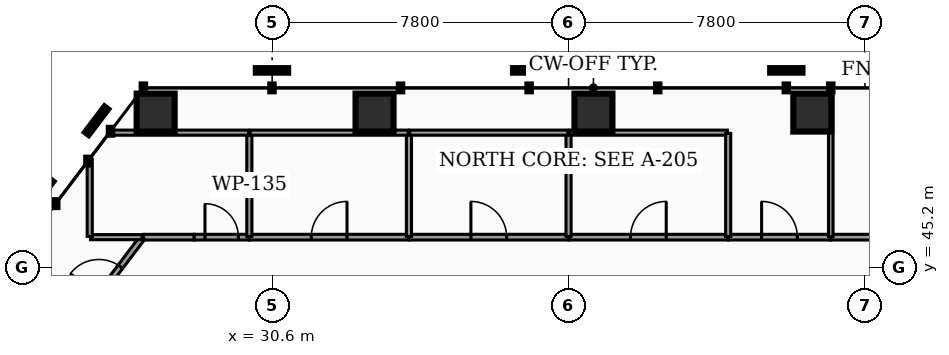
"""IFC4 building model, lengths in metres.
Left out: names, types, materials, properties, quantities, classifications, styles, units other than length and angle.
Written with IfcOpenShell. Run it as: python <this file> out.ifc"""

import sys

from ifc_helpers import new_model, si_unit, direction, frame, frame_2d, origin, origin_2d, place, context, subcontext, project, spatial, rectangle, hollow_rectangle, extrude, element, fill, save


model = new_model("IFC4")
c1 = context("Model", 3, precision=1e-05, world=origin(), true_north=direction((0.0, 1.0)))
c2 = subcontext(c1, "Body", "Model", "MODEL_VIEW")
j1 = project(units=[si_unit("LENGTHUNIT", "METRE"), si_unit("PLANEANGLEUNIT", "RADIAN")], contexts=[c1])
p1 = place(None, origin())
s1 = spatial("IfcSite", under=j1, at=p1, CompositionType="ELEMENT")
p2 = place(p1, origin())
s2 = spatial("IfcBuilding", under=s1, at=p2, CompositionType="ELEMENT")
p3 = place(p2, frame((0.0, 0.0, 56.1)))
s3 = spatial("IfcBuildingStorey", under=s2, at=p3, CompositionType="ELEMENT", Elevation=56.1)
for number, where, z_axis, x_axis in (
    (1, (44.814, 49.278, 0.0), (0.0, 0.0, 1.0), (1.0, 0.0, 0.0)),
    (2, (39.054, 49.278, 0.0), (0.0, 0.0, 1.0), (1.0, 0.0, 0.0)),
    (3, (33.294, 49.278, 0.0), (0.0, 0.0, 1.0), (1.0, 0.0, 0.0)),
    (4, (27.534, 49.278, 0.0), (0.0, 0.0, 1.0), (1.0, 0.0, 0.0)),
):
    element("IfcColumn", number, at=place(p3, frame(where, z_axis=z_axis, x_axis=x_axis)), inside=s3, PredefinedType="COLUMN", context=c2, shape_type="SweptSolid", body=[
        extrude(hollow_rectangle(XDim=1.0, YDim=1.0, WallThickness=0.05, at=origin_2d()), origin(), (0.0, 0.0, 1.0), 3.82),
    ])
p4 = place(p3, frame((27.217, 46.0, 0.0), z_axis=(0.0, 0.0, 1.0), x_axis=(1.0, 0.0, 0.0)))
e5 = element("IfcWall", 5, at=p4, inside=s3, PredefinedType="PARTITIONING", context=c2, shape_type="SweptSolid", body=[
    extrude(rectangle(XDim=1.333, YDim=0.15, at=frame_2d((0.667, 0.0))), origin(), (0.0, 0.0, 1.0), 2.777),
])
p5 = place(p3, frame((28.55, 46.0, 0.0), z_axis=(0.0, 0.0, 1.0), x_axis=(1.0, 0.0, 0.0)))
e6 = element("IfcWall", 6, at=p5, inside=s3, PredefinedType="PARTITIONING", context=c2, shape_type="SweptSolid", body=[
    extrude(rectangle(XDim=1.445, YDim=0.15, at=frame_2d((0.723, 0.0))), origin(), (0.0, 0.0, 1.0), 2.777),
])
p6 = place(p5, frame((0.282, 0.0, 0.0)))
e7 = element("IfcOpeningElement", 7, at=p6, cuts=e6, PredefinedType="OPENING", context=c2, shape_type="SweptSolid", body=[
    extrude(rectangle(XDim=0.88, YDim=2.05, at=frame_2d((0.44, 1.025))), frame((0.0, 0.085, 0.0), z_axis=(0.0, -1.0, 0.0), x_axis=(1.0, 0.0, 0.0)), (0.0, 0.0, 1.0), 0.17),
])
p7 = place(p3, frame((30.005, 46.0, 0.0), z_axis=(0.0, 0.0, 1.0), x_axis=(1.0, 0.0, 0.0)))
e8 = element("IfcWall", 8, at=p7, inside=s3, PredefinedType="PARTITIONING", context=c2, shape_type="SweptSolid", body=[
    extrude(rectangle(XDim=4.19, YDim=0.15, at=frame_2d((2.095, 0.0))), origin(), (0.0, 0.0, 1.0), 2.777),
])
p8 = place(p7, frame((1.625, 0.0, 0.0)))
e9 = element("IfcOpeningElement", 9, at=p8, cuts=e8, PredefinedType="OPENING", context=c2, shape_type="SweptSolid", body=[
    extrude(rectangle(XDim=0.94, YDim=2.05, at=frame_2d((0.47, 1.025))), frame((0.0, 0.085, 0.0), z_axis=(0.0, -1.0, 0.0), x_axis=(1.0, 0.0, 0.0)), (0.0, 0.0, 1.0), 0.17),
])
p9 = place(p3, frame((34.205, 46.0, 0.0), z_axis=(0.0, 0.0, 1.0), x_axis=(1.0, 0.0, 0.0)))
e10 = element("IfcWall", 10, at=p9, inside=s3, PredefinedType="PARTITIONING", context=c2, shape_type="SweptSolid", body=[
    extrude(rectangle(XDim=4.19, YDim=0.15, at=frame_2d((2.095, 0.0))), origin(), (0.0, 0.0, 1.0), 2.777),
])
p10 = place(p9, frame((1.625, 0.0, 0.0)))
e11 = element("IfcOpeningElement", 11, at=p10, cuts=e10, PredefinedType="OPENING", context=c2, shape_type="SweptSolid", body=[
    extrude(rectangle(XDim=0.94, YDim=2.05, at=frame_2d((0.47, 1.025))), frame((0.0, 0.085, 0.0), z_axis=(0.0, -1.0, 0.0), x_axis=(1.0, 0.0, 0.0)), (0.0, 0.0, 1.0), 0.17),
])
p11 = place(p3, frame((38.405, 46.0, 0.0), z_axis=(0.0, 0.0, 1.0), x_axis=(1.0, 0.0, 0.0)))
e12 = element("IfcWall", 12, at=p11, inside=s3, PredefinedType="PARTITIONING", context=c2, shape_type="SweptSolid", body=[
    extrude(rectangle(XDim=4.19, YDim=0.15, at=frame_2d((2.095, 0.0))), origin(), (0.0, 0.0, 1.0), 2.777),
])
p12 = place(p11, frame((1.625, 0.0, 0.0)))
e13 = element("IfcOpeningElement", 13, at=p12, cuts=e12, PredefinedType="OPENING", context=c2, shape_type="SweptSolid", body=[
    extrude(rectangle(XDim=0.94, YDim=2.05, at=frame_2d((0.47, 1.025))), frame((0.0, 0.085, 0.0), z_axis=(0.0, -1.0, 0.0), x_axis=(1.0, 0.0, 0.0)), (0.0, 0.0, 1.0), 0.17),
])
p13 = place(p3, frame((25.462, 43.71, 0.0), z_axis=(0.0, 0.0, 1.0), x_axis=(0.603800014115, 0.797135837204, 0.0)))
e14 = element("IfcWall", 14, at=p13, inside=s3, PredefinedType="PARTITIONING", context=c2, shape_type="SweptSolid", body=[
    extrude(rectangle(XDim=2.853, YDim=0.15, at=frame_2d((1.426, 0.0))), origin(), (0.0, 0.0, 1.0), 2.777),
])
p14 = place(p13, frame((0.956, 0.0, 0.0)))
e15 = element("IfcOpeningElement", 15, at=p14, cuts=e14, PredefinedType="OPENING", context=c2, shape_type="SweptSolid", body=[
    extrude(rectangle(XDim=0.94, YDim=2.05, at=frame_2d((0.47, 1.025))), frame((0.0, 0.085, 0.0), z_axis=(0.0, -1.0, 0.0), x_axis=(1.0, 0.0, 0.0)), (0.0, 0.0, 1.0), 0.17),
])
p15 = place(p3, frame((45.305, 46.0, 0.0), z_axis=(0.0, 0.0, 1.0), x_axis=(1.0, 0.0, 0.0)))
e16 = element("IfcWall", 16, at=p15, inside=s3, PredefinedType="PARTITIONING", context=c2, shape_type="SweptSolid", body=[
    extrude(rectangle(XDim=3.045, YDim=0.15, at=frame_2d((1.522, 0.0))), origin(), (0.0, 0.0, 1.0), 2.777),
])
p16 = place(p3, frame((42.605, 46.0, 0.0), z_axis=(0.0, 0.0, 1.0), x_axis=(1.0, 0.0, 0.0)))
e17 = element("IfcWall", 17, at=p16, inside=s3, PredefinedType="PARTITIONING", context=c2, shape_type="SweptSolid", body=[
    extrude(rectangle(XDim=2.69, YDim=0.15, at=frame_2d((1.345, 0.0))), origin(), (0.0, 0.0, 1.0), 2.777),
])
p17 = place(p16, frame((0.875, 0.0, 0.0)))
e18 = element("IfcOpeningElement", 18, at=p17, cuts=e17, PredefinedType="OPENING", context=c2, shape_type="SweptSolid", body=[
    extrude(rectangle(XDim=0.94, YDim=2.05, at=frame_2d((0.47, 1.025))), frame((0.0, 0.085, 0.0), z_axis=(0.0, -1.0, 0.0), x_axis=(1.0, 0.0, 0.0)), (0.0, 0.0, 1.0), 0.17),
])
p18 = place(p3, frame((30.0, 46.02, 0.0), z_axis=(0.0, 0.0, 1.0), x_axis=(0.0, 1.0, 0.0)))
e19 = element("IfcWall", 19, at=p18, inside=s3, PredefinedType="PARTITIONING", context=c2, shape_type="SweptSolid", body=[
    extrude(rectangle(XDim=2.71, YDim=0.135, at=frame_2d((1.355, 0.0))), origin(), (0.0, 0.0, 1.0), 2.777),
])
p19 = place(p3, frame((25.82, 46.0, 0.0), z_axis=(0.0, 0.0, 1.0), x_axis=(1.0, 0.0, 0.0)))
e20 = element("IfcWall", 20, at=p19, inside=s3, PredefinedType="PARTITIONING", context=c2, shape_type="SweptSolid", body=[
    extrude(rectangle(XDim=1.356, YDim=0.135, at=frame_2d((0.678, 0.0))), origin(), (0.0, 0.0, 1.0), 2.777),
])
p20 = place(p3, frame((25.8, 46.02, 0.0), z_axis=(0.0, 0.0, 1.0), x_axis=(0.0, 1.0, 0.0)))
e21 = element("IfcWall", 21, at=p20, inside=s3, PredefinedType="PARTITIONING", context=c2, shape_type="SweptSolid", body=[
    extrude(rectangle(XDim=2.03, YDim=0.135, at=frame_2d((1.015, 0.0))), origin(), (0.0, 0.0, 1.0), 2.777),
])
p21 = place(p3, frame((26.334, 48.75, 0.0), z_axis=(0.0, 0.0, 1.0), x_axis=(1.0, 0.0, 0.0)))
e22 = element("IfcWall", 22, at=p21, inside=s3, PredefinedType="PARTITIONING", context=c2, shape_type="SweptSolid", body=[
    extrude(rectangle(XDim=3.646, YDim=0.135, at=frame_2d((1.823, 0.0))), origin(), (0.0, 0.0, 1.0), 2.777),
])
p22 = place(p3, frame((34.2, 46.02, 0.0), z_axis=(0.0, 0.0, 1.0), x_axis=(0.0, 1.0, 0.0)))
e23 = element("IfcWall", 23, at=p22, inside=s3, PredefinedType="PARTITIONING", context=c2, shape_type="SweptSolid", body=[
    extrude(rectangle(XDim=2.71, YDim=0.135, at=frame_2d((1.355, 0.0))), origin(), (0.0, 0.0, 1.0), 2.777),
])
p23 = place(p3, frame((30.02, 48.75, 0.0), z_axis=(0.0, 0.0, 1.0), x_axis=(1.0, 0.0, 0.0)))
e24 = element("IfcWall", 24, at=p23, inside=s3, PredefinedType="PARTITIONING", context=c2, shape_type="SweptSolid", body=[
    extrude(rectangle(XDim=4.16, YDim=0.135, at=frame_2d((2.08, 0.0))), origin(), (0.0, 0.0, 1.0), 2.777),
])
p24 = place(p3, frame((38.4, 46.02, 0.0), z_axis=(0.0, 0.0, 1.0), x_axis=(0.0, 1.0, 0.0)))
e25 = element("IfcWall", 25, at=p24, inside=s3, PredefinedType="PARTITIONING", context=c2, shape_type="SweptSolid", body=[
    extrude(rectangle(XDim=2.71, YDim=0.135, at=frame_2d((1.355, 0.0))), origin(), (0.0, 0.0, 1.0), 2.777),
])
p25 = place(p3, frame((34.22, 48.75, 0.0), z_axis=(0.0, 0.0, 1.0), x_axis=(1.0, 0.0, 0.0)))
e26 = element("IfcWall", 26, at=p25, inside=s3, PredefinedType="PARTITIONING", context=c2, shape_type="SweptSolid", body=[
    extrude(rectangle(XDim=4.16, YDim=0.135, at=frame_2d((2.08, 0.0))), origin(), (0.0, 0.0, 1.0), 2.777),
])
p26 = place(p3, frame((38.42, 48.75, 0.0), z_axis=(0.0, 0.0, 1.0), x_axis=(1.0, 0.0, 0.0)))
e27 = element("IfcWall", 27, at=p26, inside=s3, PredefinedType="PARTITIONING", context=c2, shape_type="SweptSolid", body=[
    extrude(rectangle(XDim=4.16, YDim=0.135, at=frame_2d((2.08, 0.0))), origin(), (0.0, 0.0, 1.0), 2.777),
])
p27 = place(p3, frame((42.6, 46.02, 0.0), z_axis=(0.0, 0.0, 1.0), x_axis=(0.0, 1.0, 0.0)))
e28 = element("IfcWall", 28, at=p27, inside=s3, PredefinedType="PARTITIONING", context=c2, shape_type="SweptSolid", body=[
    extrude(rectangle(XDim=2.71, YDim=0.135, at=frame_2d((1.355, 0.0))), origin(), (0.0, 0.0, 1.0), 2.777),
])
p28 = place(p3, frame((45.3, 46.02, 0.0), z_axis=(0.0, 0.0, 1.0), x_axis=(0.0, 1.0, 0.0)))
e29 = element("IfcWall", 29, at=p28, inside=s3, PredefinedType="PARTITIONING", context=c2, shape_type="SweptSolid", body=[
    extrude(rectangle(XDim=3.893, YDim=0.12, at=frame_2d((1.946, 0.0))), origin(), (0.0, 0.0, 1.0), 2.777),
])
p29 = place(p6, origin())
e30 = element("IfcDoor", 30, at=p29, inside=s3, OperationType="SINGLE_SWING_LEFT", PredefinedType="DOOR", context=c2, shape_type="SweptSolid", body=[
    extrude(rectangle(XDim=0.88, YDim=2.05, at=frame_2d((0.44, 1.025))), frame((0.0, 0.025, 0.0), z_axis=(0.0, -1.0, 0.0), x_axis=(1.0, 0.0, 0.0)), (0.0, 0.0, 1.0), 0.05),
])
fill(e7, e30)
p30 = place(p8, origin())
e31 = element("IfcDoor", 31, at=p30, inside=s3, OperationType="SINGLE_SWING_RIGHT", PredefinedType="DOOR", context=c2, shape_type="SweptSolid", body=[
    extrude(rectangle(XDim=0.94, YDim=2.05, at=frame_2d((0.47, 1.025))), frame((0.0, 0.025, 0.0), z_axis=(0.0, -1.0, 0.0), x_axis=(1.0, 0.0, 0.0)), (0.0, 0.0, 1.0), 0.05),
])
fill(e9, e31)
p31 = place(p10, origin())
e32 = element("IfcDoor", 32, at=p31, inside=s3, OperationType="SINGLE_SWING_LEFT", PredefinedType="DOOR", context=c2, shape_type="SweptSolid", body=[
    extrude(rectangle(XDim=0.94, YDim=2.05, at=frame_2d((0.47, 1.025))), frame((0.0, 0.025, 0.0), z_axis=(0.0, -1.0, 0.0), x_axis=(1.0, 0.0, 0.0)), (0.0, 0.0, 1.0), 0.05),
])
fill(e11, e32)
p32 = place(p12, origin())
e33 = element("IfcDoor", 33, at=p32, inside=s3, OperationType="SINGLE_SWING_RIGHT", PredefinedType="DOOR", context=c2, shape_type="SweptSolid", body=[
    extrude(rectangle(XDim=0.94, YDim=2.05, at=frame_2d((0.47, 1.025))), frame((0.0, 0.025, 0.0), z_axis=(0.0, -1.0, 0.0), x_axis=(1.0, 0.0, 0.0)), (0.0, 0.0, 1.0), 0.05),
])
fill(e13, e33)
p33 = place(p14, origin())
e34 = element("IfcDoor", 34, at=p33, inside=s3, OperationType="SINGLE_SWING_LEFT", PredefinedType="DOOR", context=c2, shape_type="SweptSolid", body=[
    extrude(rectangle(XDim=0.94, YDim=2.05, at=frame_2d((0.47, 1.025))), frame((0.0, 0.025, 0.0), z_axis=(0.0, -1.0, 0.0), x_axis=(1.0, 0.0, 0.0)), (0.0, 0.0, 1.0), 0.05),
])
fill(e15, e34)
p34 = place(p17, origin())
e35 = element("IfcDoor", 35, at=p34, inside=s3, OperationType="SINGLE_SWING_LEFT", PredefinedType="DOOR", context=c2, shape_type="SweptSolid", body=[
    extrude(rectangle(XDim=0.94, YDim=2.05, at=frame_2d((0.47, 1.025))), frame((0.0, 0.025, 0.0), z_axis=(0.0, -1.0, 0.0), x_axis=(1.0, 0.0, 0.0)), (0.0, 0.0, 1.0), 0.05),
])
fill(e18, e35)
save(model, sys.argv[1])
